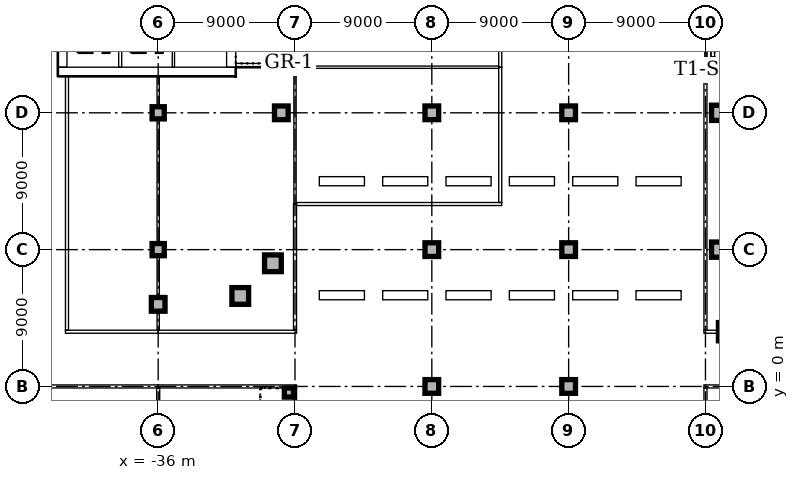
"""IFC4 building model, lengths in metres.
Left out: names, types, materials, properties, quantities, classifications, styles, units other than length and angle.
Written with IfcOpenShell. Run it as: python <this file> out.ifc"""

import sys

from ifc_helpers import new_model, si_unit, direction, frame, frame_2d, origin, origin_2d, place, context, subcontext, project, spatial, rectangle, extrude, element, fill, save


model = new_model("IFC4")
c1 = context("Model", 3, precision=1e-05, world=origin(), true_north=direction((0.0, 1.0)))
c2 = subcontext(c1, "Body", "Model", "MODEL_VIEW")
j1 = project(units=[si_unit("LENGTHUNIT", "METRE"), si_unit("PLANEANGLEUNIT", "RADIAN")], contexts=[c1])
p1 = place(None, origin())
s1 = spatial("IfcSite", under=j1, at=p1, CompositionType="ELEMENT")
p2 = place(p1, origin())
s2 = spatial("IfcBuilding", under=s1, at=p2, CompositionType="ELEMENT")
p3 = place(p2, origin())
s3 = spatial("IfcBuildingStorey", under=s2, at=p3, CompositionType="ELEMENT", Elevation=0.0)
p4 = place(p3, frame((0.36, 21.125, 0.0), z_axis=(0.0, 0.0, 1.0), x_axis=(1.0, 0.0, 0.0)))
e1 = element("IfcWall", 1, at=p4, inside=s3, PredefinedType="SOLIDWALL", context=c2, shape_type="SweptSolid", body=[
    extrude(rectangle(XDim=3.54, YDim=0.25, at=frame_2d((1.77, 0.0))), origin(), (0.0, 0.0, 1.0), 6.0),
])
p5 = place(p3, frame((0.235, 21.0, 0.0), z_axis=(0.0, 0.0, 1.0), x_axis=(0.0, 1.0, 0.0)))
e2 = element("IfcWall", 2, at=p5, inside=s3, PredefinedType="SOLIDWALL", context=c2, shape_type="SweptSolid", body=[
    extrude(rectangle(XDim=21.0, YDim=0.25, at=frame_2d((10.5, 0.0))), origin(), (0.0, 0.0, 1.0), 6.0),
])
p6 = place(p5, frame((10.0, 0.0, 0.0)))
e3 = element("IfcOpeningElement", 3, at=p6, cuts=e2, PredefinedType="OPENING", context=c2, shape_type="SweptSolid", body=[
    extrude(rectangle(XDim=1.0, YDim=2.1, at=frame_2d((0.5, 1.05))), frame((0.0, 0.135, 0.0), z_axis=(0.0, -1.0, 0.0), x_axis=(1.0, 0.0, 0.0)), (0.0, 0.0, 1.0), 0.27),
])
p7 = place(p3, frame((1.453, 3.602, 0.0), z_axis=(0.0, 0.0, 1.0), x_axis=(1.0, 0.0, 0.0)))
e4 = element("IfcColumn", 4, at=p7, inside=s3, PredefinedType="COLUMN", context=c2, shape_type="SweptSolid", body=[
    extrude(rectangle(XDim=1.2, YDim=1.2, at=origin_2d()), origin(), (0.0, 0.0, 1.0), 5.7),
])
for number, where, z_axis, x_axis in (
    (5, (0.9, 9.0, 0.0), (0.0, 0.0, 1.0), (1.0, 0.0, 0.0)),
    (6, (0.9, 18.0, 0.0), (0.0, 0.0, 1.0), (1.0, 0.0, 0.0)),
):
    element("IfcColumn", number, at=place(p3, frame(where, z_axis=z_axis, x_axis=x_axis)), inside=s3, PredefinedType="COLUMN", context=c2, shape_type="SweptSolid", body=[
        extrude(rectangle(XDim=1.0, YDim=1.0, at=origin_2d()), origin(), (0.0, 0.0, 1.0), 5.7),
    ])
p8 = place(p3, frame((-42.6, 20.7, 0.0), z_axis=(0.0, 0.0, 1.0), x_axis=(1.0, 0.0, 0.0)))
e7 = element("IfcWall", 7, at=p8, inside=s3, PredefinedType="SOLIDWALL", context=c2, shape_type="SweptSolid", body=[
    extrude(rectangle(XDim=11.7, YDim=0.6, at=frame_2d((5.85, 0.0))), origin(), (0.0, 0.0, 1.0), 6.0),
])
p9 = place(p3, frame((-31.2, 21.0, 0.0), z_axis=(0.0, 0.0, 1.0), x_axis=(0.0, 1.0, 0.0)))
e8 = element("IfcWall", 8, at=p9, inside=s3, PredefinedType="SOLIDWALL", context=c2, shape_type="SweptSolid", body=[
    extrude(rectangle(XDim=9.5, YDim=0.6, at=frame_2d((4.75, 0.0))), origin(), (0.0, 0.0, 1.0), 6.0),
])
p10 = place(p9, frame((5.25, 0.0, 0.0)))
e9 = element("IfcOpeningElement", 9, at=p10, cuts=e8, PredefinedType="OPENING", context=c2, shape_type="SweptSolid", body=[
    extrude(rectangle(XDim=1.0, YDim=2.1, at=frame_2d((0.5, 1.05))), frame((0.0, 0.31, 0.0), z_axis=(0.0, -1.0, 0.0), x_axis=(1.0, 0.0, 0.0)), (0.0, 0.0, 1.0), 0.62),
])
p11 = place(p3, frame((-42.3, 30.5, 0.0), z_axis=(0.0, 0.0, 1.0), x_axis=(0.0, -1.0, 0.0)))
e10 = element("IfcWall", 10, at=p11, inside=s3, PredefinedType="SOLIDWALL", context=c2, shape_type="SweptSolid", body=[
    extrude(rectangle(XDim=9.5, YDim=0.6, at=frame_2d((4.75, 0.0))), origin(), (0.0, 0.0, 1.0), 6.0),
])
p12 = place(p11, frame((3.85, 0.0, 0.0)))
e11 = element("IfcOpeningElement", 11, at=p12, cuts=e10, PredefinedType="OPENING", context=c2, shape_type="SweptSolid", body=[
    extrude(rectangle(XDim=1.8, YDim=2.1, at=frame_2d((0.9, 1.05))), frame((0.0, 0.31, 0.0), z_axis=(0.0, -1.0, 0.0), x_axis=(1.0, 0.0, 0.0)), (0.0, 0.0, 1.0), 0.62),
])
p13 = place(p3, frame((-30.9, 21.125, 0.0), z_axis=(0.0, 0.0, 1.0), x_axis=(1.0, 0.0, 0.0)))
e12 = element("IfcWall", 12, at=p13, inside=s3, PredefinedType="SOLIDWALL", context=c2, shape_type="SweptSolid", body=[
    extrude(rectangle(XDim=3.54, YDim=0.25, at=frame_2d((1.77, 0.0))), origin(), (0.0, 0.0, 1.0), 6.0),
])
p14 = place(p3, frame((-27.235, 21.0, 0.0), z_axis=(0.0, 0.0, 1.0), x_axis=(0.0, 1.0, 0.0)))
e13 = element("IfcWall", 13, at=p14, inside=s3, PredefinedType="SOLIDWALL", context=c2, shape_type="SweptSolid", body=[
    extrude(rectangle(XDim=6.65, YDim=0.25, at=frame_2d((3.325, 0.0))), origin(), (0.0, 0.0, 1.0), 6.0),
])
for number, where, z_axis, x_axis in (
    (14, (-30.602, 5.953, 0.0), (0.0, 0.0, 1.0), (1.0, 0.0, 0.0)),
    (15, (-28.453, 8.102, 0.0), (0.0, 0.0, 1.0), (1.0, 0.0, 0.0)),
):
    element("IfcColumn", number, at=place(p3, frame(where, z_axis=z_axis, x_axis=x_axis)), inside=s3, PredefinedType="COLUMN", context=c2, shape_type="SweptSolid", body=[
        extrude(rectangle(XDim=1.1, YDim=1.1, at=origin_2d()), origin(), (0.0, 0.0, 1.0), 5.7),
    ])
for number, where, z_axis, x_axis in (
    (16, (-36.0, 5.4, 0.0), (0.0, 0.0, 1.0), (1.0, 0.0, 0.0)),
    (17, (-27.9, 18.0, 0.0), (0.0, 0.0, 1.0), (1.0, 0.0, 0.0)),
):
    element("IfcColumn", number, at=place(p3, frame(where, z_axis=z_axis, x_axis=x_axis)), inside=s3, PredefinedType="COLUMN", context=c2, shape_type="SweptSolid", body=[
        extrude(rectangle(XDim=0.9, YDim=0.9, at=origin_2d()), origin(), (0.0, 0.0, 1.0), 5.7),
    ])
for number, where, z_axis, x_axis in (
    (18, (-36.0, 9.0, 0.0), (0.0, 0.0, 1.0), (1.0, 0.0, 0.0)),
    (19, (-36.0, 18.0, 0.0), (0.0, 0.0, 1.0), (1.0, 0.0, 0.0)),
):
    element("IfcColumn", number, at=place(p3, frame(where, z_axis=z_axis, x_axis=x_axis)), inside=s3, PredefinedType="COLUMN", context=c2, shape_type="SweptSolid", body=[
        extrude(rectangle(XDim=0.8, YDim=0.8, at=origin_2d()), origin(), (0.0, 0.0, 1.0), 5.7),
    ])
for number, where, z_axis, x_axis in (
    (20, (-18.0, 0.0, 0.0), (0.0, 0.0, 1.0), (1.0, 0.0, 0.0)),
    (21, (-18.0, 9.0, 0.0), (0.0, 0.0, 1.0), (1.0, 0.0, 0.0)),
    (22, (-18.0, 18.0, 0.0), (0.0, 0.0, 1.0), (1.0, 0.0, 0.0)),
    (23, (-9.0, 0.0, 0.0), (0.0, 0.0, 1.0), (1.0, 0.0, 0.0)),
    (24, (-9.0, 9.0, 0.0), (0.0, 0.0, 1.0), (1.0, 0.0, 0.0)),
    (25, (-9.0, 18.0, 0.0), (0.0, 0.0, 1.0), (1.0, 0.0, 0.0)),
):
    element("IfcColumn", number, at=place(p3, frame(where, z_axis=z_axis, x_axis=x_axis)), inside=s3, PredefinedType="COLUMN", context=c2, shape_type="SweptSolid", body=[
        extrude(rectangle(XDim=0.9, YDim=0.9, at=origin_2d()), origin(), (0.0, 0.0, 1.0), 5.7),
    ])
p15 = place(p3, frame((-27.4, -0.4, 0.0), z_axis=(0.0, 0.0, 1.0), x_axis=(1.0, 0.0, 0.0)))
e26 = element("IfcColumn", 26, at=p15, inside=s3, PredefinedType="COLUMN", context=c2, shape_type="SweptSolid", body=[
    extrude(rectangle(XDim=0.6, YDim=0.6, at=origin_2d()), origin(), (0.0, 0.0, 1.0), 6.0),
])
p16 = place(p3, frame((-27.0, -8.53, 0.0), z_axis=(0.0, 0.0, 1.0), x_axis=(0.0, 1.0, 0.0)))
e27 = element("IfcWall", 27, at=p16, inside=s3, PredefinedType="SOLIDWALL", context=c2, shape_type="SweptSolid", body=[
    extrude(rectangle(XDim=8.43, YDim=0.2, at=frame_2d((4.215, 0.0))), origin(), (0.0, 0.0, 1.0), 5.7),
])
p17 = place(p3, frame((-36.0, 0.0, 0.0), z_axis=(0.0, 0.0, 1.0), x_axis=(1.0, 0.0, 0.0)))
e28 = element("IfcWall", 28, at=p17, inside=s3, PredefinedType="SOLIDWALL", context=c2, shape_type="SweptSolid", body=[
    extrude(rectangle(XDim=9.1, YDim=0.2, at=frame_2d((4.55, 0.0))), origin(), (0.0, 0.0, 1.0), 5.7),
])
p18 = place(p3, frame((-36.0, -8.53, 0.0), z_axis=(0.0, 0.0, 1.0), x_axis=(0.0, 1.0, 0.0)))
e29 = element("IfcWall", 29, at=p18, inside=s3, PredefinedType="SOLIDWALL", context=c2, shape_type="SweptSolid", body=[
    extrude(rectangle(XDim=8.43, YDim=0.2, at=frame_2d((4.215, 0.0))), origin(), (0.0, 0.0, 1.0), 5.7),
])
p19 = place(p3, frame((0.0, -8.53, 0.0), z_axis=(0.0, 0.0, 1.0), x_axis=(0.0, 1.0, 0.0)))
e30 = element("IfcWall", 30, at=p19, inside=s3, PredefinedType="PARTITIONING", context=c2, shape_type="SweptSolid", body=[
    extrude(rectangle(XDim=8.43, YDim=0.2, at=frame_2d((4.215, 0.0))), origin(), (0.0, 0.0, 1.0), 5.7),
])
p20 = place(p19, frame((2.03, 0.0, 0.0)))
e31 = element("IfcOpeningElement", 31, at=p20, cuts=e30, PredefinedType="OPENING", context=c2, shape_type="SweptSolid", body=[
    extrude(rectangle(XDim=1.0, YDim=2.1, at=frame_2d((0.5, 1.05))), frame((0.0, 0.11, 0.0), z_axis=(0.0, -1.0, 0.0), x_axis=(1.0, 0.0, 0.0)), (0.0, 0.0, 1.0), 0.22),
])
p21 = place(p3, frame((-26.9, 12.0, 0.0), z_axis=(0.0, 0.0, 1.0), x_axis=(1.0, 0.0, 0.0)))
e32 = element("IfcWall", 32, at=p21, inside=s3, PredefinedType="PARTITIONING", context=c2, shape_type="SweptSolid", body=[
    extrude(rectangle(XDim=13.5, YDim=0.2, at=frame_2d((6.75, 0.0))), origin(), (0.0, 0.0, 1.0), 5.7),
])
p22 = place(p21, frame((1.65, 0.0, 0.0)))
e33 = element("IfcOpeningElement", 33, at=p22, cuts=e32, PredefinedType="OPENING", context=c2, shape_type="SweptSolid", body=[
    extrude(rectangle(XDim=1.0, YDim=2.1, at=frame_2d((0.5, 1.05))), frame((0.0, 0.11, 0.0), z_axis=(0.0, -1.0, 0.0), x_axis=(1.0, 0.0, 0.0)), (0.0, 0.0, 1.0), 0.22),
])
p23 = place(p3, frame((-13.5, 12.1, 0.0), z_axis=(0.0, 0.0, 1.0), x_axis=(0.0, 1.0, 0.0)))
e34 = element("IfcWall", 34, at=p23, inside=s3, PredefinedType="PARTITIONING", context=c2, shape_type="SweptSolid", body=[
    extrude(rectangle(XDim=8.9, YDim=0.2, at=frame_2d((4.45, 0.0))), origin(), (0.0, 0.0, 1.0), 5.7),
])
p24 = place(p3, frame((-27.075, 21.0, 0.0), z_axis=(0.0, 0.0, 1.0), x_axis=(1.0, 0.0, 0.0)))
e35 = element("IfcWall", 35, at=p24, inside=s3, PredefinedType="PARTITIONING", context=c2, shape_type="SweptSolid", body=[
    extrude(rectangle(XDim=13.475, YDim=0.15, at=frame_2d((6.737, 0.0))), origin(), (0.0, 0.0, 1.0), 5.7),
])
p25 = place(p3, frame((-27.0, 12.0, 0.0), z_axis=(0.0, 0.0, 1.0), x_axis=(0.0, 1.0, 0.0)))
e36 = element("IfcWall", 36, at=p25, inside=s3, PredefinedType="PARTITIONING", context=c2, shape_type="SweptSolid", body=[
    extrude(rectangle(XDim=8.925, YDim=0.15, at=frame_2d((4.463, 0.0))), origin(), (0.0, 0.0, 1.0), 5.7),
])
p26 = place(p3, frame((-27.0, 3.7, 0.0), z_axis=(0.0, 0.0, 1.0), x_axis=(0.0, 1.0, 0.0)))
e37 = element("IfcWall", 37, at=p26, inside=s3, PredefinedType="PARTITIONING", context=c2, shape_type="SweptSolid", body=[
    extrude(rectangle(XDim=8.3, YDim=0.2, at=frame_2d((4.15, 0.0))), origin(), (0.0, 0.0, 1.0), 5.7),
])
p27 = place(p3, frame((0.0, 3.7, 0.0), z_axis=(0.0, 0.0, 1.0), x_axis=(0.0, 1.0, 0.0)))
e38 = element("IfcWall", 38, at=p27, inside=s3, PredefinedType="PARTITIONING", context=c2, shape_type="SweptSolid", body=[
    extrude(rectangle(XDim=17.3, YDim=0.2, at=frame_2d((8.65, 0.0))), origin(), (0.0, 0.0, 1.0), 5.7),
])
p28 = place(p27, frame((7.7, 0.0, 0.0)))
e39 = element("IfcOpeningElement", 39, at=p28, cuts=e38, PredefinedType="OPENING", context=c2, shape_type="SweptSolid", body=[
    extrude(rectangle(XDim=1.8, YDim=2.1, at=frame_2d((0.9, 1.05))), frame((0.0, 0.11, 0.0), z_axis=(0.0, -1.0, 0.0), x_axis=(1.0, 0.0, 0.0)), (0.0, 0.0, 1.0), 0.22),
])
p29 = place(p3, frame((-13.5, 21.0, 0.0), z_axis=(0.0, 0.0, 1.0), x_axis=(0.0, 1.0, 0.0)))
e40 = element("IfcWall", 40, at=p29, inside=s3, PredefinedType="PARTITIONING", context=c2, shape_type="SweptSolid", body=[
    extrude(rectangle(XDim=10.0, YDim=0.2, at=frame_2d((5.0, 0.0))), origin(), (0.0, 0.0, 1.0), 5.7),
])
p30 = place(p29, frame((5.5, 0.0, 0.0)))
e41 = element("IfcOpeningElement", 41, at=p30, cuts=e40, PredefinedType="OPENING", context=c2, shape_type="SweptSolid", body=[
    extrude(rectangle(XDim=1.0, YDim=2.1, at=frame_2d((0.5, 1.05))), frame((0.0, 0.11, 0.0), z_axis=(0.0, -1.0, 0.0), x_axis=(1.0, 0.0, 0.0)), (0.0, 0.0, 1.0), 0.22),
])
p31 = place(p3, frame((-45.0, 0.0, 0.0), z_axis=(0.0, 0.0, 1.0), x_axis=(1.0, 0.0, 0.0)))
e42 = element("IfcWall", 42, at=p31, inside=s3, PredefinedType="PARTITIONING", context=c2, shape_type="SweptSolid", body=[
    extrude(rectangle(XDim=9.0, YDim=0.2, at=frame_2d((4.5, 0.0))), origin(), (0.0, 0.0, 1.0), 5.7),
])
p32 = place(p31, frame((4.0, 0.0, 0.0)))
e43 = element("IfcOpeningElement", 43, at=p32, cuts=e42, PredefinedType="OPENING", context=c2, shape_type="SweptSolid", body=[
    extrude(rectangle(XDim=1.0, YDim=2.1, at=frame_2d((0.5, 1.05))), frame((0.0, 0.11, 0.0), z_axis=(0.0, -1.0, 0.0), x_axis=(1.0, 0.0, 0.0)), (0.0, 0.0, 1.0), 0.22),
])
p33 = place(p3, frame((-42.1, 3.6, 0.0), z_axis=(0.0, 0.0, 1.0), x_axis=(1.0, 0.0, 0.0)))
e44 = element("IfcWall", 44, at=p33, inside=s3, PredefinedType="PARTITIONING", context=c2, shape_type="SweptSolid", body=[
    extrude(rectangle(XDim=6.1, YDim=0.2, at=frame_2d((3.05, 0.0))), origin(), (0.0, 0.0, 1.0), 5.7),
])
p34 = place(p3, frame((-36.0, 3.6, 0.0), z_axis=(0.0, 0.0, 1.0), x_axis=(1.0, 0.0, 0.0)))
e45 = element("IfcWall", 45, at=p34, inside=s3, PredefinedType="PARTITIONING", context=c2, shape_type="SweptSolid", body=[
    extrude(rectangle(XDim=9.1, YDim=0.2, at=frame_2d((4.55, 0.0))), origin(), (0.0, 0.0, 1.0), 5.7),
])
p35 = place(p34, frame((4.0, 0.0, 0.0)))
e46 = element("IfcOpeningElement", 46, at=p35, cuts=e45, PredefinedType="OPENING", context=c2, shape_type="SweptSolid", body=[
    extrude(rectangle(XDim=1.0, YDim=2.1, at=frame_2d((0.5, 1.05))), frame((0.0, 0.11, 0.0), z_axis=(0.0, -1.0, 0.0), x_axis=(1.0, 0.0, 0.0)), (0.0, 0.0, 1.0), 0.22),
])
p36 = place(p3, frame((-0.1, 0.0, 0.0), z_axis=(0.0, 0.0, 1.0), x_axis=(1.0, 0.0, 0.0)))
e47 = element("IfcWall", 47, at=p36, inside=s3, PredefinedType="PARTITIONING", context=c2, shape_type="SweptSolid", body=[
    extrude(rectangle(XDim=9.1, YDim=0.2, at=frame_2d((4.55, 0.0))), origin(), (0.0, 0.0, 1.0), 5.7),
])
p37 = place(p3, frame((-0.1, 3.6, 0.0), z_axis=(0.0, 0.0, 1.0), x_axis=(1.0, 0.0, 0.0)))
e48 = element("IfcWall", 48, at=p37, inside=s3, PredefinedType="PARTITIONING", context=c2, shape_type="SweptSolid", body=[
    extrude(rectangle(XDim=0.933, YDim=0.2, at=frame_2d((0.467, 0.0))), origin(), (0.0, 0.0, 1.0), 5.7),
])
p38 = place(p3, frame((-42.0, 3.7, 0.0), z_axis=(0.0, 0.0, 1.0), x_axis=(0.0, 1.0, 0.0)))
e49 = element("IfcWall", 49, at=p38, inside=s3, PredefinedType="PARTITIONING", context=c2, shape_type="SweptSolid", body=[
    extrude(rectangle(XDim=16.7, YDim=0.2, at=frame_2d((8.35, 0.0))), origin(), (0.0, 0.0, 1.0), 5.7),
])
p39 = place(p38, frame((7.8, 0.0, 0.0)))
e50 = element("IfcOpeningElement", 50, at=p39, cuts=e49, PredefinedType="OPENING", context=c2, shape_type="SweptSolid", body=[
    extrude(rectangle(XDim=1.0, YDim=2.1, at=frame_2d((0.5, 1.05))), frame((0.0, 0.11, 0.0), z_axis=(0.0, -1.0, 0.0), x_axis=(1.0, 0.0, 0.0)), (0.0, 0.0, 1.0), 0.22),
])
p40 = place(p3, frame((-36.0, 3.7, 0.0), z_axis=(0.0, 0.0, 1.0), x_axis=(0.0, 1.0, 0.0)))
e51 = element("IfcWall", 51, at=p40, inside=s3, PredefinedType="PARTITIONING", context=c2, shape_type="SweptSolid", body=[
    extrude(rectangle(XDim=1.23, YDim=0.15, at=frame_2d((0.615, 0.0))), origin(), (0.0, 0.0, 1.0), 5.7),
])
p41 = place(p3, frame((-36.0, 5.87, 0.0), z_axis=(0.0, 0.0, 1.0), x_axis=(0.0, 1.0, 0.0)))
e52 = element("IfcWall", 52, at=p41, inside=s3, PredefinedType="PARTITIONING", context=c2, shape_type="SweptSolid", body=[
    extrude(rectangle(XDim=2.71, YDim=0.15, at=frame_2d((1.355, 0.0))), origin(), (0.0, 0.0, 1.0), 5.7),
])
p42 = place(p3, frame((-36.0, 9.42, 0.0), z_axis=(0.0, 0.0, 1.0), x_axis=(0.0, 1.0, 0.0)))
e53 = element("IfcWall", 53, at=p42, inside=s3, PredefinedType="PARTITIONING", context=c2, shape_type="SweptSolid", body=[
    extrude(rectangle(XDim=8.16, YDim=0.15, at=frame_2d((4.08, 0.0))), origin(), (0.0, 0.0, 1.0), 5.7),
])
p43 = place(p3, frame((-36.0, 18.42, 0.0), z_axis=(0.0, 0.0, 1.0), x_axis=(0.0, 1.0, 0.0)))
e54 = element("IfcWall", 54, at=p43, inside=s3, PredefinedType="PARTITIONING", context=c2, shape_type="SweptSolid", body=[
    extrude(rectangle(XDim=1.98, YDim=0.15, at=frame_2d((0.99, 0.0))), origin(), (0.0, 0.0, 1.0), 5.7),
])
p44 = place(p3, frame((-25.4, 6.0, 0.0), z_axis=(0.0, 0.0, 1.0), x_axis=(1.0, 0.0, 0.0)))
e55 = element("IfcWall", 55, at=p44, inside=s3, PredefinedType="MOVABLE", context=c2, shape_type="SweptSolid", body=[
    extrude(rectangle(XDim=2.967, YDim=0.6, at=frame_2d((1.483, 0.0))), origin(), (0.0, 0.0, 1.0), 1.1),
])
p45 = place(p3, frame((-21.233, 6.0, 0.0), z_axis=(0.0, 0.0, 1.0), x_axis=(1.0, 0.0, 0.0)))
e56 = element("IfcWall", 56, at=p45, inside=s3, PredefinedType="MOVABLE", context=c2, shape_type="SweptSolid", body=[
    extrude(rectangle(XDim=2.967, YDim=0.6, at=frame_2d((1.483, 0.0))), origin(), (0.0, 0.0, 1.0), 1.1),
])
for number, where, z_axis, x_axis in (
    (57, (-17.067, 6.0, 0.0), (0.0, 0.0, 1.0), (1.0, 0.0, 0.0)),
    (58, (-12.9, 6.0, 0.0), (0.0, 0.0, 1.0), (1.0, 0.0, 0.0)),
):
    element("IfcWall", number, at=place(p3, frame(where, z_axis=z_axis, x_axis=x_axis)), inside=s3, PredefinedType="MOVABLE", context=c2, shape_type="SweptSolid", body=[
        extrude(rectangle(XDim=2.967, YDim=0.6, at=frame_2d((1.483, 0.0))), origin(), (0.0, 0.0, 1.0), 1.1),
    ])
p46 = place(p3, frame((-8.733, 6.0, 0.0), z_axis=(0.0, 0.0, 1.0), x_axis=(1.0, 0.0, 0.0)))
e59 = element("IfcWall", 59, at=p46, inside=s3, PredefinedType="MOVABLE", context=c2, shape_type="SweptSolid", body=[
    extrude(rectangle(XDim=2.967, YDim=0.6, at=frame_2d((1.483, 0.0))), origin(), (0.0, 0.0, 1.0), 1.1),
])
for number, where, z_axis, x_axis in (
    (60, (-4.567, 6.0, 0.0), (0.0, 0.0, 1.0), (1.0, 0.0, 0.0)),
    (61, (-25.4, 13.5, 0.0), (0.0, 0.0, 1.0), (1.0, 0.0, 0.0)),
):
    element("IfcWall", number, at=place(p3, frame(where, z_axis=z_axis, x_axis=x_axis)), inside=s3, PredefinedType="MOVABLE", context=c2, shape_type="SweptSolid", body=[
        extrude(rectangle(XDim=2.967, YDim=0.6, at=frame_2d((1.483, 0.0))), origin(), (0.0, 0.0, 1.0), 1.1),
    ])
p47 = place(p3, frame((-21.233, 13.5, 0.0), z_axis=(0.0, 0.0, 1.0), x_axis=(1.0, 0.0, 0.0)))
e62 = element("IfcWall", 62, at=p47, inside=s3, PredefinedType="MOVABLE", context=c2, shape_type="SweptSolid", body=[
    extrude(rectangle(XDim=2.967, YDim=0.6, at=frame_2d((1.483, 0.0))), origin(), (0.0, 0.0, 1.0), 1.1),
])
for number, where, z_axis, x_axis in (
    (63, (-17.067, 13.5, 0.0), (0.0, 0.0, 1.0), (1.0, 0.0, 0.0)),
    (64, (-12.9, 13.5, 0.0), (0.0, 0.0, 1.0), (1.0, 0.0, 0.0)),
):
    element("IfcWall", number, at=place(p3, frame(where, z_axis=z_axis, x_axis=x_axis)), inside=s3, PredefinedType="MOVABLE", context=c2, shape_type="SweptSolid", body=[
        extrude(rectangle(XDim=2.967, YDim=0.6, at=frame_2d((1.483, 0.0))), origin(), (0.0, 0.0, 1.0), 1.1),
    ])
p48 = place(p3, frame((-8.733, 13.5, 0.0), z_axis=(0.0, 0.0, 1.0), x_axis=(1.0, 0.0, 0.0)))
e65 = element("IfcWall", 65, at=p48, inside=s3, PredefinedType="MOVABLE", context=c2, shape_type="SweptSolid", body=[
    extrude(rectangle(XDim=2.967, YDim=0.6, at=frame_2d((1.483, 0.0))), origin(), (0.0, 0.0, 1.0), 1.1),
])
p49 = place(p3, frame((-4.567, 13.5, 0.0), z_axis=(0.0, 0.0, 1.0), x_axis=(1.0, 0.0, 0.0)))
e66 = element("IfcWall", 66, at=p49, inside=s3, PredefinedType="MOVABLE", context=c2, shape_type="SweptSolid", body=[
    extrude(rectangle(XDim=2.967, YDim=0.6, at=frame_2d((1.483, 0.0))), origin(), (0.0, 0.0, 1.0), 1.1),
])
p50 = place(p3, frame((0.48, 21.25, 0.0), z_axis=(0.0, 0.0, 1.0), x_axis=(0.0, 1.0, 0.0)))
e67 = element("IfcWall", 67, at=p50, inside=s3, PredefinedType="STANDARD", context=c2, shape_type="SweptSolid", body=[
    extrude(rectangle(XDim=1.955, YDim=0.24, at=frame_2d((0.978, 0.0))), origin(), (0.0, 0.0, 1.0), 6.0),
])
p51 = place(p3, frame((-38.5, 21.0, 0.0), z_axis=(0.0, 0.0, 1.0), x_axis=(0.0, 1.0, 0.0)))
e68 = element("IfcWall", 68, at=p51, inside=s3, PredefinedType="SOLIDWALL", context=c2, shape_type="SweptSolid", body=[
    extrude(rectangle(XDim=3.1, YDim=0.2, at=frame_2d((1.55, 0.0))), origin(), (0.0, 0.0, 1.0), 6.0),
])
p52 = place(p3, frame((-35.0, 21.0, 0.0), z_axis=(0.0, 0.0, 1.0), x_axis=(0.0, 1.0, 0.0)))
e69 = element("IfcWall", 69, at=p52, inside=s3, PredefinedType="SOLIDWALL", context=c2, shape_type="SweptSolid", body=[
    extrude(rectangle(XDim=2.9, YDim=0.15, at=frame_2d((1.45, 0.0))), origin(), (0.0, 0.0, 1.0), 6.0),
])
p53 = place(p22, origin())
e70 = element("IfcDoor", 70, at=p53, inside=s3, OperationType="SINGLE_SWING_RIGHT", PredefinedType="DOOR", context=c2, shape_type="SweptSolid", body=[
    extrude(rectangle(XDim=1.0, YDim=2.1, at=frame_2d((0.5, 1.05))), frame((0.0, 0.025, 0.0), z_axis=(0.0, -1.0, 0.0), x_axis=(1.0, 0.0, 0.0)), (0.0, 0.0, 1.0), 0.05),
])
fill(e33, e70)
p54 = place(p32, frame((1.0, 0.0, 0.0), z_axis=(0.0, 0.0, 1.0), x_axis=(-1.0, 0.0, 0.0)))
e71 = element("IfcDoor", 71, at=p54, inside=s3, OperationType="SINGLE_SWING_LEFT", PredefinedType="DOOR", context=c2, shape_type="SweptSolid", body=[
    extrude(rectangle(XDim=1.0, YDim=2.1, at=frame_2d((0.5, 1.05))), frame((0.0, 0.025, 0.0), z_axis=(0.0, -1.0, 0.0), x_axis=(1.0, 0.0, 0.0)), (0.0, 0.0, 1.0), 0.05),
])
fill(e43, e71)
p55 = place(p39, frame((1.0, 0.0, 0.0), z_axis=(0.0, 0.0, 1.0), x_axis=(-1.0, 0.0, 0.0)))
e72 = element("IfcDoor", 72, at=p55, inside=s3, OperationType="SINGLE_SWING_LEFT", PredefinedType="DOOR", context=c2, shape_type="SweptSolid", body=[
    extrude(rectangle(XDim=1.0, YDim=2.1, at=frame_2d((0.5, 1.05))), frame((0.0, 0.025, 0.0), z_axis=(0.0, -1.0, 0.0), x_axis=(1.0, 0.0, 0.0)), (0.0, 0.0, 1.0), 0.05),
])
fill(e50, e72)
p56 = place(p35, origin())
e73 = element("IfcDoor", 73, at=p56, inside=s3, OperationType="SINGLE_SWING_RIGHT", PredefinedType="DOOR", context=c2, shape_type="SweptSolid", body=[
    extrude(rectangle(XDim=1.0, YDim=2.1, at=frame_2d((0.5, 1.05))), frame((0.0, 0.025, 0.0), z_axis=(0.0, -1.0, 0.0), x_axis=(1.0, 0.0, 0.0)), (0.0, 0.0, 1.0), 0.05),
])
fill(e46, e73)
p57 = place(p28, frame((1.8, 0.0, 0.0), z_axis=(0.0, 0.0, 1.0), x_axis=(-1.0, 0.0, 0.0)))
e74 = element("IfcDoor", 74, at=p57, inside=s3, OperationType="DOUBLE_DOOR_SINGLE_SWING", PredefinedType="DOOR", context=c2, shape_type="SweptSolid", body=[
    extrude(rectangle(XDim=1.8, YDim=2.1, at=frame_2d((0.9, 1.05))), frame((0.0, 0.025, 0.0), z_axis=(0.0, -1.0, 0.0), x_axis=(1.0, 0.0, 0.0)), (0.0, 0.0, 1.0), 0.05),
])
fill(e39, e74)
save(model, sys.argv[1])
